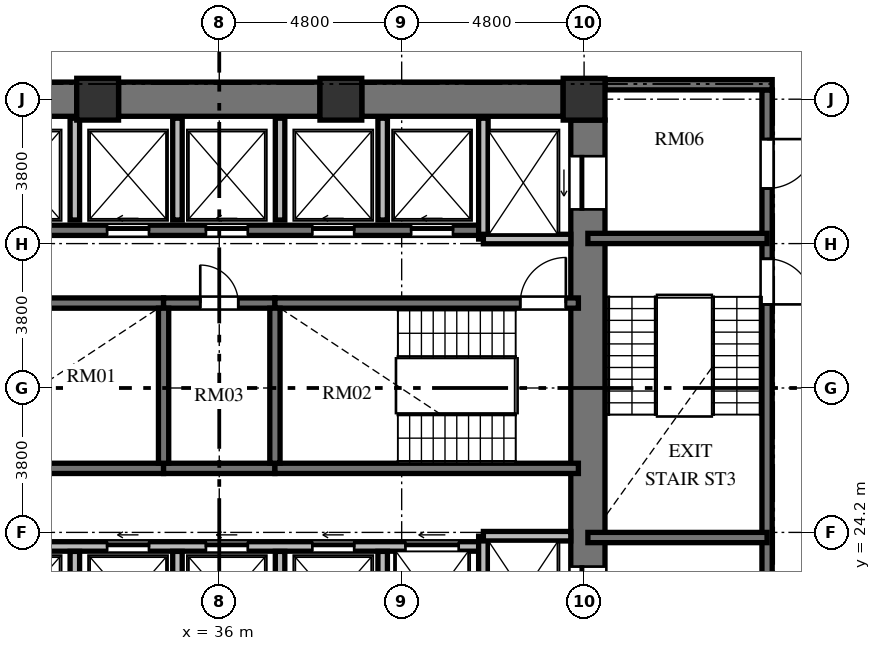
"""IFC4 building model, lengths in metres.
Left out: names, types, materials, properties, quantities, classifications, styles, units other than length and angle.
Written with IfcOpenShell. Run it as: python <this file> out.ifc"""

import sys

from ifc_helpers import new_model, si_unit, direction, frame, frame_2d, origin, origin_2d, place, context, subcontext, project, spatial, rectangle, extrude, element, fill, save


model = new_model("IFC4")
c1 = context("Model", 3, precision=1e-05, world=origin(), true_north=direction((0.0, 1.0)))
c2 = subcontext(c1, "Body", "Model", "MODEL_VIEW")
j1 = project(units=[si_unit("LENGTHUNIT", "METRE"), si_unit("PLANEANGLEUNIT", "RADIAN")], contexts=[c1])
p1 = place(None, origin())
s1 = spatial("IfcSite", under=j1, at=p1, CompositionType="ELEMENT")
p2 = place(p1, origin())
s2 = spatial("IfcBuilding", under=s1, at=p2, CompositionType="ELEMENT")
p3 = place(p2, frame((0.0, 0.0, 25.2)))
s3 = spatial("IfcBuildingStorey", under=s2, at=p3, CompositionType="ELEMENT", Elevation=25.2)
for number, where, z_axis, x_axis in (
    (1, (45.6, 35.6, 0.0), (0.0, 0.0, 1.0), (1.0, 0.0, 0.0)),
    (2, (39.2, 35.6, 0.0), (0.0, 0.0, 1.0), (1.0, 0.0, 0.0)),
    (3, (32.8, 35.6, 0.0), (0.0, 0.0, 1.0), (1.0, 0.0, 0.0)),
):
    element("IfcColumn", number, at=place(p3, frame(where, z_axis=z_axis, x_axis=x_axis)), inside=s3, PredefinedType="COLUMN", context=c2, shape_type="SweptSolid", body=[
        extrude(rectangle(XDim=1.1, YDim=1.1, at=origin_2d()), origin(), (0.0, 0.0, 1.0), 3.648),
    ])
p4 = place(p3, frame((45.7, 20.95, 0.0), z_axis=(0.0, 0.0, 1.0), x_axis=(0.0, 1.0, 0.0)))
e4 = element("IfcWall", 4, at=p4, inside=s3, PredefinedType="SHEAR", context=c2, shape_type="SweptSolid", body=[
    extrude(rectangle(XDim=14.1, YDim=0.9, at=frame_2d((7.05, 0.0))), origin(), (0.0, 0.0, 1.0), 3.648),
])
p5 = place(p4, frame((11.75, 0.0, 0.0)))
e5 = element("IfcOpeningElement", 5, at=p5, cuts=e4, PredefinedType="OPENING", context=c2, shape_type="SweptSolid", body=[
    extrude(rectangle(XDim=1.4, YDim=2.3, at=frame_2d((0.7, 1.15))), frame((0.0, 0.46, 0.0), z_axis=(0.0, -1.0, 0.0), x_axis=(1.0, 0.0, 0.0)), (0.0, 0.0, 1.0), 0.92),
])
p6 = place(p4, frame((0.95, 0.0, 0.0)))
e6 = element("IfcOpeningElement", 6, at=p6, cuts=e4, PredefinedType="OPENING", context=c2, shape_type="SweptSolid", body=[
    extrude(rectangle(XDim=1.4, YDim=2.3, at=frame_2d((0.7, 1.15))), frame((0.0, 0.46, 0.0), z_axis=(0.0, -1.0, 0.0), x_axis=(1.0, 0.0, 0.0)), (0.0, 0.0, 1.0), 0.92),
])
p7 = place(p3, frame((26.95, 35.6, 0.0), z_axis=(0.0, 0.0, 1.0), x_axis=(1.0, 0.0, 0.0)))
e7 = element("IfcWall", 7, at=p7, inside=s3, PredefinedType="SHEAR", context=c2, shape_type="SweptSolid", body=[
    extrude(rectangle(XDim=5.3, YDim=0.9, at=frame_2d((2.65, 0.0))), origin(), (0.0, 0.0, 1.0), 3.648),
])
p8 = place(p3, frame((33.35, 35.6, 0.0), z_axis=(0.0, 0.0, 1.0), x_axis=(1.0, 0.0, 0.0)))
e8 = element("IfcWall", 8, at=p8, inside=s3, PredefinedType="SHEAR", context=c2, shape_type="SweptSolid", body=[
    extrude(rectangle(XDim=5.3, YDim=0.9, at=frame_2d((2.65, 0.0))), origin(), (0.0, 0.0, 1.0), 3.648),
])
p9 = place(p3, frame((39.75, 35.6, 0.0), z_axis=(0.0, 0.0, 1.0), x_axis=(1.0, 0.0, 0.0)))
e9 = element("IfcWall", 9, at=p9, inside=s3, PredefinedType="SHEAR", context=c2, shape_type="SweptSolid", body=[
    extrude(rectangle(XDim=5.3, YDim=0.9, at=frame_2d((2.65, 0.0))), origin(), (0.0, 0.0, 1.0), 3.648),
])
p10 = place(p3, frame((26.55, 30.235, 0.0), z_axis=(0.0, 0.0, 1.0), x_axis=(1.0, 0.0, 0.0)))
e10 = element("IfcWall", 10, at=p10, inside=s3, PredefinedType="SHEAR", context=c2, shape_type="SweptSolid", body=[
    extrude(rectangle(XDim=7.985, YDim=0.27, at=frame_2d((3.992, 0.0))), origin(), (0.0, 0.0, 1.0), 3.648),
])
p11 = place(p3, frame((34.535, 30.235, 0.0), z_axis=(0.0, 0.0, 1.0), x_axis=(1.0, 0.0, 0.0)))
e11 = element("IfcWall", 11, at=p11, inside=s3, PredefinedType="SHEAR", context=c2, shape_type="SweptSolid", body=[
    extrude(rectangle(XDim=2.93, YDim=0.27, at=frame_2d((1.465, 0.0))), origin(), (0.0, 0.0, 1.0), 3.648),
])
p12 = place(p11, frame((0.965, 0.0, 0.0)))
e12 = element("IfcOpeningElement", 12, at=p12, cuts=e11, PredefinedType="OPENING", context=c2, shape_type="SweptSolid", body=[
    extrude(rectangle(XDim=1.0, YDim=2.1, at=frame_2d((0.5, 1.05))), frame((0.0, 0.145, 0.0), z_axis=(0.0, -1.0, 0.0), x_axis=(1.0, 0.0, 0.0)), (0.0, 0.0, 1.0), 0.29),
])
p13 = place(p3, frame((37.465, 30.235, 0.0), z_axis=(0.0, 0.0, 1.0), x_axis=(1.0, 0.0, 0.0)))
e13 = element("IfcWall", 13, at=p13, inside=s3, PredefinedType="SHEAR", context=c2, shape_type="SweptSolid", body=[
    extrude(rectangle(XDim=7.985, YDim=0.27, at=frame_2d((3.992, 0.0))), origin(), (0.0, 0.0, 1.0), 3.648),
])
p14 = place(p13, frame((6.455, 0.0, 0.0)))
e14 = element("IfcOpeningElement", 14, at=p14, cuts=e13, PredefinedType="OPENING", context=c2, shape_type="SweptSolid", body=[
    extrude(rectangle(XDim=1.2, YDim=2.15, at=frame_2d((0.6, 1.075))), frame((0.0, 0.145, 0.0), z_axis=(0.0, -1.0, 0.0), x_axis=(1.0, 0.0, 0.0)), (0.0, 0.0, 1.0), 0.29),
])
p15 = place(p3, frame((26.55, 25.885, 0.0), z_axis=(0.0, 0.0, 1.0), x_axis=(1.0, 0.0, 0.0)))
e15 = element("IfcWall", 15, at=p15, inside=s3, PredefinedType="SHEAR", context=c2, shape_type="SweptSolid", body=[
    extrude(rectangle(XDim=7.985, YDim=0.27, at=frame_2d((3.992, 0.0))), origin(), (0.0, 0.0, 1.0), 3.648),
])
p16 = place(p3, frame((34.535, 25.885, 0.0), z_axis=(0.0, 0.0, 1.0), x_axis=(1.0, 0.0, 0.0)))
e16 = element("IfcWall", 16, at=p16, inside=s3, PredefinedType="SHEAR", context=c2, shape_type="SweptSolid", body=[
    extrude(rectangle(XDim=2.93, YDim=0.27, at=frame_2d((1.465, 0.0))), origin(), (0.0, 0.0, 1.0), 3.648),
])
p17 = place(p3, frame((37.465, 25.885, 0.0), z_axis=(0.0, 0.0, 1.0), x_axis=(1.0, 0.0, 0.0)))
e17 = element("IfcWall", 17, at=p17, inside=s3, PredefinedType="SHEAR", context=c2, shape_type="SweptSolid", body=[
    extrude(rectangle(XDim=7.985, YDim=0.27, at=frame_2d((3.992, 0.0))), origin(), (0.0, 0.0, 1.0), 3.648),
])
for number, where, z_axis, x_axis in (
    (18, (34.535, 26.02, 0.0), (0.0, 0.0, 1.0), (0.0, 1.0, 0.0)),
    (19, (37.465, 26.02, 0.0), (0.0, 0.0, 1.0), (0.0, 1.0, 0.0)),
):
    element("IfcWall", number, at=place(p3, frame(where, z_axis=z_axis, x_axis=x_axis)), inside=s3, PredefinedType="SHEAR", context=c2, shape_type="SweptSolid", body=[
        extrude(rectangle(XDim=4.08, YDim=0.27, at=frame_2d((2.04, 0.0))), origin(), (0.0, 0.0, 1.0), 3.648),
    ])
p18 = place(p3, frame((26.55, 32.15, 0.0), z_axis=(0.0, 0.0, 1.0), x_axis=(1.0, 0.0, 0.0)))
e20 = element("IfcWall", 20, at=p18, inside=s3, PredefinedType="SHEAR", context=c2, shape_type="SweptSolid", body=[
    extrude(rectangle(XDim=16.4, YDim=0.27, at=frame_2d((8.2, 0.0))), origin(), (0.0, 0.0, 1.0), 3.648),
])
p19 = place(p18, frame((1.1, 0.0, 0.0)))
e21 = element("IfcOpeningElement", 21, at=p19, cuts=e20, PredefinedType="OPENING", context=c2, shape_type="SweptSolid", body=[
    extrude(rectangle(XDim=1.1, YDim=2.2, at=frame_2d((0.55, 1.1))), frame((0.0, 0.145, 0.0), z_axis=(0.0, -1.0, 0.0), x_axis=(1.0, 0.0, 0.0)), (0.0, 0.0, 1.0), 0.29),
])
p20 = place(p18, frame((3.7, 0.0, 0.0)))
e22 = element("IfcOpeningElement", 22, at=p20, cuts=e20, PredefinedType="OPENING", context=c2, shape_type="SweptSolid", body=[
    extrude(rectangle(XDim=1.1, YDim=2.2, at=frame_2d((0.55, 1.1))), frame((0.0, 0.145, 0.0), z_axis=(0.0, -1.0, 0.0), x_axis=(1.0, 0.0, 0.0)), (0.0, 0.0, 1.0), 0.29),
])
p21 = place(p18, frame((6.5, 0.0, 0.0)))
e23 = element("IfcOpeningElement", 23, at=p21, cuts=e20, PredefinedType="OPENING", context=c2, shape_type="SweptSolid", body=[
    extrude(rectangle(XDim=1.1, YDim=2.2, at=frame_2d((0.55, 1.1))), frame((0.0, 0.145, 0.0), z_axis=(0.0, -1.0, 0.0), x_axis=(1.0, 0.0, 0.0)), (0.0, 0.0, 1.0), 0.29),
])
p22 = place(p18, frame((9.1, 0.0, 0.0)))
e24 = element("IfcOpeningElement", 24, at=p22, cuts=e20, PredefinedType="OPENING", context=c2, shape_type="SweptSolid", body=[
    extrude(rectangle(XDim=1.1, YDim=2.2, at=frame_2d((0.55, 1.1))), frame((0.0, 0.145, 0.0), z_axis=(0.0, -1.0, 0.0), x_axis=(1.0, 0.0, 0.0)), (0.0, 0.0, 1.0), 0.29),
])
p23 = place(p18, frame((11.9, 0.0, 0.0)))
e25 = element("IfcOpeningElement", 25, at=p23, cuts=e20, PredefinedType="OPENING", context=c2, shape_type="SweptSolid", body=[
    extrude(rectangle(XDim=1.1, YDim=2.2, at=frame_2d((0.55, 1.1))), frame((0.0, 0.145, 0.0), z_axis=(0.0, -1.0, 0.0), x_axis=(1.0, 0.0, 0.0)), (0.0, 0.0, 1.0), 0.29),
])
p24 = place(p18, frame((14.5, 0.0, 0.0)))
e26 = element("IfcOpeningElement", 26, at=p24, cuts=e20, PredefinedType="OPENING", context=c2, shape_type="SweptSolid", body=[
    extrude(rectangle(XDim=1.1, YDim=2.2, at=frame_2d((0.55, 1.1))), frame((0.0, 0.145, 0.0), z_axis=(0.0, -1.0, 0.0), x_axis=(1.0, 0.0, 0.0)), (0.0, 0.0, 1.0), 0.29),
])
p25 = place(p3, frame((26.75, 23.83, 0.0), z_axis=(0.0, 0.0, 1.0), x_axis=(1.0, 0.0, 0.0)))
e27 = element("IfcWall", 27, at=p25, inside=s3, PredefinedType="SOLIDWALL", context=c2, shape_type="SweptSolid", body=[
    extrude(rectangle(XDim=16.2, YDim=0.25, at=frame_2d((8.1, 0.0))), origin(), (0.0, 0.0, 1.0), 3.428),
])
p26 = place(p25, frame((0.9, 0.0, 0.0)))
e28 = element("IfcOpeningElement", 28, at=p26, cuts=e27, PredefinedType="OPENING", context=c2, shape_type="SweptSolid", body=[
    extrude(rectangle(XDim=1.1, YDim=2.2, at=frame_2d((0.55, 1.1))), frame((0.0, 0.135, 0.0), z_axis=(0.0, -1.0, 0.0), x_axis=(1.0, 0.0, 0.0)), (0.0, 0.0, 1.0), 0.27),
])
p27 = place(p25, frame((3.5, 0.0, 0.0)))
e29 = element("IfcOpeningElement", 29, at=p27, cuts=e27, PredefinedType="OPENING", context=c2, shape_type="SweptSolid", body=[
    extrude(rectangle(XDim=1.1, YDim=2.2, at=frame_2d((0.55, 1.1))), frame((0.0, 0.135, 0.0), z_axis=(0.0, -1.0, 0.0), x_axis=(1.0, 0.0, 0.0)), (0.0, 0.0, 1.0), 0.27),
])
p28 = place(p25, frame((6.3, 0.0, 0.0)))
e30 = element("IfcOpeningElement", 30, at=p28, cuts=e27, PredefinedType="OPENING", context=c2, shape_type="SweptSolid", body=[
    extrude(rectangle(XDim=1.1, YDim=2.2, at=frame_2d((0.55, 1.1))), frame((0.0, 0.135, 0.0), z_axis=(0.0, -1.0, 0.0), x_axis=(1.0, 0.0, 0.0)), (0.0, 0.0, 1.0), 0.27),
])
p29 = place(p25, frame((8.9, 0.0, 0.0)))
e31 = element("IfcOpeningElement", 31, at=p29, cuts=e27, PredefinedType="OPENING", context=c2, shape_type="SweptSolid", body=[
    extrude(rectangle(XDim=1.1, YDim=2.2, at=frame_2d((0.55, 1.1))), frame((0.0, 0.135, 0.0), z_axis=(0.0, -1.0, 0.0), x_axis=(1.0, 0.0, 0.0)), (0.0, 0.0, 1.0), 0.27),
])
p30 = place(p25, frame((11.7, 0.0, 0.0)))
e32 = element("IfcOpeningElement", 32, at=p30, cuts=e27, PredefinedType="OPENING", context=c2, shape_type="SweptSolid", body=[
    extrude(rectangle(XDim=1.1, YDim=2.2, at=frame_2d((0.55, 1.1))), frame((0.0, 0.135, 0.0), z_axis=(0.0, -1.0, 0.0), x_axis=(1.0, 0.0, 0.0)), (0.0, 0.0, 1.0), 0.27),
])
p31 = place(p25, frame((14.15, 0.0, 0.0)))
e33 = element("IfcOpeningElement", 33, at=p31, cuts=e27, PredefinedType="OPENING", context=c2, shape_type="SweptSolid", body=[
    extrude(rectangle(XDim=1.4, YDim=2.3, at=frame_2d((0.7, 1.15))), frame((0.0, 0.135, 0.0), z_axis=(0.0, -1.0, 0.0), x_axis=(1.0, 0.0, 0.0)), (0.0, 0.0, 1.0), 0.27),
])
p32 = place(p3, frame((42.95, 31.92, 0.0), z_axis=(0.0, 0.0, 1.0), x_axis=(0.0, 1.0, 0.0)))
e34 = element("IfcWall", 34, at=p32, inside=s3, PredefinedType="SOLIDWALL", context=c2, shape_type="SweptSolid", body=[
    extrude(rectangle(XDim=3.18, YDim=0.25, at=frame_2d((1.59, 0.0))), origin(), (0.0, 0.0, 1.0), 3.428),
])
p33 = place(p3, frame((42.95, 31.92, 0.0), z_axis=(0.0, 0.0, 1.0), x_axis=(1.0, 0.0, 0.0)))
e35 = element("IfcWall", 35, at=p33, inside=s3, PredefinedType="SOLIDWALL", context=c2, shape_type="SweptSolid", body=[
    extrude(rectangle(XDim=2.3, YDim=0.25, at=frame_2d((1.15, 0.0))), origin(), (0.0, 0.0, 1.0), 3.428),
])
p34 = place(p3, frame((42.95, 20.9, 0.0), z_axis=(0.0, 0.0, 1.0), x_axis=(0.0, 1.0, 0.0)))
e36 = element("IfcWall", 36, at=p34, inside=s3, PredefinedType="SOLIDWALL", context=c2, shape_type="SweptSolid", body=[
    extrude(rectangle(XDim=3.2, YDim=0.25, at=frame_2d((1.6, 0.0))), origin(), (0.0, 0.0, 1.0), 3.428),
])
p35 = place(p3, frame((42.95, 24.1, 0.0), z_axis=(0.0, 0.0, 1.0), x_axis=(1.0, 0.0, 0.0)))
e37 = element("IfcWall", 37, at=p35, inside=s3, PredefinedType="SOLIDWALL", context=c2, shape_type="SweptSolid", body=[
    extrude(rectangle(XDim=2.3, YDim=0.25, at=frame_2d((1.15, 0.0))), origin(), (0.0, 0.0, 1.0), 3.428),
])
p36 = place(p3, frame((32.2, 32.42, 0.0), z_axis=(0.0, 0.0, 1.0), x_axis=(0.0, 1.0, 0.0)))
e38 = element("IfcWall", 38, at=p36, inside=s3, PredefinedType="SOLIDWALL", context=c2, shape_type="SweptSolid", body=[
    extrude(rectangle(XDim=2.68, YDim=0.25, at=frame_2d((1.34, 0.0))), origin(), (0.0, 0.0, 1.0), 3.428),
])
p37 = place(p3, frame((32.2, 20.9, 0.0), z_axis=(0.0, 0.0, 1.0), x_axis=(0.0, 1.0, 0.0)))
e39 = element("IfcWall", 39, at=p37, inside=s3, PredefinedType="SOLIDWALL", context=c2, shape_type="SweptSolid", body=[
    extrude(rectangle(XDim=2.8, YDim=0.25, at=frame_2d((1.4, 0.0))), origin(), (0.0, 0.0, 1.0), 3.428),
])
p38 = place(p3, frame((34.9, 32.42, 0.0), z_axis=(0.0, 0.0, 1.0), x_axis=(0.0, 1.0, 0.0)))
e40 = element("IfcWall", 40, at=p38, inside=s3, PredefinedType="SOLIDWALL", context=c2, shape_type="SweptSolid", body=[
    extrude(rectangle(XDim=2.68, YDim=0.25, at=frame_2d((1.34, 0.0))), origin(), (0.0, 0.0, 1.0), 3.428),
])
p39 = place(p3, frame((34.9, 20.9, 0.0), z_axis=(0.0, 0.0, 1.0), x_axis=(0.0, 1.0, 0.0)))
e41 = element("IfcWall", 41, at=p39, inside=s3, PredefinedType="SOLIDWALL", context=c2, shape_type="SweptSolid", body=[
    extrude(rectangle(XDim=2.8, YDim=0.25, at=frame_2d((1.4, 0.0))), origin(), (0.0, 0.0, 1.0), 3.428),
])
p40 = place(p3, frame((37.6, 32.42, 0.0), z_axis=(0.0, 0.0, 1.0), x_axis=(0.0, 1.0, 0.0)))
e42 = element("IfcWall", 42, at=p40, inside=s3, PredefinedType="SOLIDWALL", context=c2, shape_type="SweptSolid", body=[
    extrude(rectangle(XDim=2.68, YDim=0.25, at=frame_2d((1.34, 0.0))), origin(), (0.0, 0.0, 1.0), 3.428),
])
p41 = place(p3, frame((37.6, 20.9, 0.0), z_axis=(0.0, 0.0, 1.0), x_axis=(0.0, 1.0, 0.0)))
e43 = element("IfcWall", 43, at=p41, inside=s3, PredefinedType="SOLIDWALL", context=c2, shape_type="SweptSolid", body=[
    extrude(rectangle(XDim=2.8, YDim=0.25, at=frame_2d((1.4, 0.0))), origin(), (0.0, 0.0, 1.0), 3.428),
])
p42 = place(p3, frame((40.3, 32.42, 0.0), z_axis=(0.0, 0.0, 1.0), x_axis=(0.0, 1.0, 0.0)))
e44 = element("IfcWall", 44, at=p42, inside=s3, PredefinedType="SOLIDWALL", context=c2, shape_type="SweptSolid", body=[
    extrude(rectangle(XDim=2.68, YDim=0.25, at=frame_2d((1.34, 0.0))), origin(), (0.0, 0.0, 1.0), 3.428),
])
p43 = place(p3, frame((40.3, 20.9, 0.0), z_axis=(0.0, 0.0, 1.0), x_axis=(0.0, 1.0, 0.0)))
e45 = element("IfcWall", 45, at=p43, inside=s3, PredefinedType="SOLIDWALL", context=c2, shape_type="SweptSolid", body=[
    extrude(rectangle(XDim=2.8, YDim=0.25, at=frame_2d((1.4, 0.0))), origin(), (0.0, 0.0, 1.0), 3.428),
])
p44 = place(p3, frame((50.415, 35.845, 0.0), z_axis=(0.0, 0.0, 1.0), x_axis=(0.0, -1.0, 0.0)))
e46 = element("IfcWall", 46, at=p44, inside=s3, PredefinedType="SHEAR", context=c2, shape_type="SweptSolid", body=[
    extrude(rectangle(XDim=15.825, YDim=0.27, at=frame_2d((7.913, 0.0))), origin(), (0.0, 0.0, 1.0), 3.648),
])
p45 = place(p44, frame((4.445, 0.0, 0.0)))
e47 = element("IfcOpeningElement", 47, at=p45, cuts=e46, PredefinedType="OPENING", context=c2, shape_type="SweptSolid", body=[
    extrude(rectangle(XDim=1.2, YDim=2.15, at=frame_2d((0.6, 1.075))), frame((0.0, 0.145, 0.0), z_axis=(0.0, -1.0, 0.0), x_axis=(1.0, 0.0, 0.0)), (0.0, 0.0, 1.0), 0.29),
])
p46 = place(p44, frame((1.295, 0.0, 0.0)))
e48 = element("IfcOpeningElement", 48, at=p46, cuts=e46, PredefinedType="OPENING", context=c2, shape_type="SweptSolid", body=[
    extrude(rectangle(XDim=1.3, YDim=2.2, at=frame_2d((0.65, 1.1))), frame((0.0, 0.145, 0.0), z_axis=(0.0, -1.0, 0.0), x_axis=(1.0, 0.0, 0.0)), (0.0, 0.0, 1.0), 0.29),
])
p47 = place(p44, frame((13.095, 0.0, 0.0)))
e49 = element("IfcOpeningElement", 49, at=p47, cuts=e46, PredefinedType="OPENING", context=c2, shape_type="SweptSolid", body=[
    extrude(rectangle(XDim=1.3, YDim=2.2, at=frame_2d((0.65, 1.1))), frame((0.0, 0.145, 0.0), z_axis=(0.0, -1.0, 0.0), x_axis=(1.0, 0.0, 0.0)), (0.0, 0.0, 1.0), 0.29),
])
p48 = place(p3, frame((46.15, 35.98, 0.0), z_axis=(0.0, 0.0, 1.0), x_axis=(1.0, 0.0, 0.0)))
e50 = element("IfcWall", 50, at=p48, inside=s3, PredefinedType="SHEAR", context=c2, shape_type="SweptSolid", body=[
    extrude(rectangle(XDim=4.4, YDim=0.27, at=frame_2d((2.2, 0.0))), origin(), (0.0, 0.0, 1.0), 3.648),
])
for number, where, z_axis, x_axis in (
    (51, (45.7, 31.935, 0.0), (0.0, 0.0, 1.0), (1.0, 0.0, 0.0)),
    (52, (45.7, 24.065, 0.0), (0.0, 0.0, 1.0), (1.0, 0.0, 0.0)),
):
    element("IfcWall", number, at=place(p3, frame(where, z_axis=z_axis, x_axis=x_axis)), inside=s3, PredefinedType="SHEAR", context=c2, shape_type="SweptSolid", body=[
        extrude(rectangle(XDim=4.715, YDim=0.27, at=frame_2d((2.357, 0.0))), origin(), (0.0, 0.0, 1.0), 3.648),
    ])
p49 = place(p14, origin())
e53 = element("IfcDoor", 53, at=p49, inside=s3, OperationType="SINGLE_SWING_RIGHT", PredefinedType="DOOR", context=c2, shape_type="SweptSolid", body=[
    extrude(rectangle(XDim=1.2, YDim=2.15, at=frame_2d((0.6, 1.075))), frame((0.0, 0.025, 0.0), z_axis=(0.0, -1.0, 0.0), x_axis=(1.0, 0.0, 0.0)), (0.0, 0.0, 1.0), 0.05),
])
fill(e14, e53)
p50 = place(p12, origin())
e54 = element("IfcDoor", 54, at=p50, inside=s3, OperationType="SINGLE_SWING_LEFT", PredefinedType="DOOR", context=c2, shape_type="SweptSolid", body=[
    extrude(rectangle(XDim=1.0, YDim=2.1, at=frame_2d((0.5, 1.05))), frame((0.0, 0.025, 0.0), z_axis=(0.0, -1.0, 0.0), x_axis=(1.0, 0.0, 0.0)), (0.0, 0.0, 1.0), 0.05),
])
fill(e12, e54)
p51 = place(p21, origin())
e55 = element("IfcDoor", 55, at=p51, inside=s3, OperationType="SLIDING_TO_LEFT", PredefinedType="DOOR", context=c2, shape_type="SweptSolid", body=[
    extrude(rectangle(XDim=1.1, YDim=2.2, at=frame_2d((0.55, 1.1))), frame((0.0, 0.025, 0.0), z_axis=(0.0, -1.0, 0.0), x_axis=(1.0, 0.0, 0.0)), (0.0, 0.0, 1.0), 0.05),
])
fill(e23, e55)
p52 = place(p22, origin())
e56 = element("IfcDoor", 56, at=p52, inside=s3, OperationType="SLIDING_TO_LEFT", PredefinedType="DOOR", context=c2, shape_type="SweptSolid", body=[
    extrude(rectangle(XDim=1.1, YDim=2.2, at=frame_2d((0.55, 1.1))), frame((0.0, 0.025, 0.0), z_axis=(0.0, -1.0, 0.0), x_axis=(1.0, 0.0, 0.0)), (0.0, 0.0, 1.0), 0.05),
])
fill(e24, e56)
p53 = place(p28, origin())
e57 = element("IfcDoor", 57, at=p53, inside=s3, OperationType="SLIDING_TO_LEFT", PredefinedType="DOOR", context=c2, shape_type="SweptSolid", body=[
    extrude(rectangle(XDim=1.1, YDim=2.2, at=frame_2d((0.55, 1.1))), frame((0.0, 0.025, 0.0), z_axis=(0.0, -1.0, 0.0), x_axis=(1.0, 0.0, 0.0)), (0.0, 0.0, 1.0), 0.05),
])
fill(e30, e57)
p54 = place(p29, origin())
e58 = element("IfcDoor", 58, at=p54, inside=s3, OperationType="SLIDING_TO_LEFT", PredefinedType="DOOR", context=c2, shape_type="SweptSolid", body=[
    extrude(rectangle(XDim=1.1, YDim=2.2, at=frame_2d((0.55, 1.1))), frame((0.0, 0.025, 0.0), z_axis=(0.0, -1.0, 0.0), x_axis=(1.0, 0.0, 0.0)), (0.0, 0.0, 1.0), 0.05),
])
fill(e31, e58)
p55 = place(p23, origin())
e59 = element("IfcDoor", 59, at=p55, inside=s3, OperationType="SLIDING_TO_LEFT", PredefinedType="DOOR", context=c2, shape_type="SweptSolid", body=[
    extrude(rectangle(XDim=1.1, YDim=2.2, at=frame_2d((0.55, 1.1))), frame((0.0, 0.025, 0.0), z_axis=(0.0, -1.0, 0.0), x_axis=(1.0, 0.0, 0.0)), (0.0, 0.0, 1.0), 0.05),
])
fill(e25, e59)
p56 = place(p24, origin())
e60 = element("IfcDoor", 60, at=p56, inside=s3, OperationType="SLIDING_TO_LEFT", PredefinedType="DOOR", context=c2, shape_type="SweptSolid", body=[
    extrude(rectangle(XDim=1.1, YDim=2.2, at=frame_2d((0.55, 1.1))), frame((0.0, 0.025, 0.0), z_axis=(0.0, -1.0, 0.0), x_axis=(1.0, 0.0, 0.0)), (0.0, 0.0, 1.0), 0.05),
])
fill(e26, e60)
p57 = place(p30, origin())
e61 = element("IfcDoor", 61, at=p57, inside=s3, OperationType="SLIDING_TO_LEFT", PredefinedType="DOOR", context=c2, shape_type="SweptSolid", body=[
    extrude(rectangle(XDim=1.1, YDim=2.2, at=frame_2d((0.55, 1.1))), frame((0.0, 0.025, 0.0), z_axis=(0.0, -1.0, 0.0), x_axis=(1.0, 0.0, 0.0)), (0.0, 0.0, 1.0), 0.05),
])
fill(e32, e61)
p58 = place(p5, origin())
e62 = element("IfcDoor", 62, at=p58, inside=s3, OperationType="SLIDING_TO_LEFT", PredefinedType="DOOR", context=c2, shape_type="SweptSolid", body=[
    extrude(rectangle(XDim=1.4, YDim=2.3, at=frame_2d((0.7, 1.15))), frame((0.0, 0.025, 0.0), z_axis=(0.0, -1.0, 0.0), x_axis=(1.0, 0.0, 0.0)), (0.0, 0.0, 1.0), 0.05),
])
fill(e5, e62)
p59 = place(p6, origin())
e63 = element("IfcDoor", 63, at=p59, inside=s3, OperationType="SLIDING_TO_LEFT", PredefinedType="DOOR", context=c2, shape_type="SweptSolid", body=[
    extrude(rectangle(XDim=1.4, YDim=2.3, at=frame_2d((0.7, 1.15))), frame((0.0, 0.025, 0.0), z_axis=(0.0, -1.0, 0.0), x_axis=(1.0, 0.0, 0.0)), (0.0, 0.0, 1.0), 0.05),
])
fill(e6, e63)
p60 = place(p31, origin())
e64 = element("IfcDoor", 64, at=p60, inside=s3, OperationType="SLIDING_TO_LEFT", PredefinedType="DOOR", context=c2, shape_type="SweptSolid", body=[
    extrude(rectangle(XDim=1.4, YDim=2.3, at=frame_2d((0.7, 1.15))), frame((0.0, 0.025, 0.0), z_axis=(0.0, -1.0, 0.0), x_axis=(1.0, 0.0, 0.0)), (0.0, 0.0, 1.0), 0.05),
])
fill(e33, e64)
p61 = place(p45, origin())
e65 = element("IfcDoor", 65, at=p61, inside=s3, OperationType="SINGLE_SWING_RIGHT", PredefinedType="DOOR", context=c2, shape_type="SweptSolid", body=[
    extrude(rectangle(XDim=1.2, YDim=2.15, at=frame_2d((0.6, 1.075))), frame((0.0, 0.025, 0.0), z_axis=(0.0, -1.0, 0.0), x_axis=(1.0, 0.0, 0.0)), (0.0, 0.0, 1.0), 0.05),
])
fill(e47, e65)
p62 = place(p46, origin())
e66 = element("IfcDoor", 66, at=p62, inside=s3, OperationType="SINGLE_SWING_LEFT", PredefinedType="DOOR", context=c2, shape_type="SweptSolid", body=[
    extrude(rectangle(XDim=1.3, YDim=2.2, at=frame_2d((0.65, 1.1))), frame((0.0, 0.025, 0.0), z_axis=(0.0, -1.0, 0.0), x_axis=(1.0, 0.0, 0.0)), (0.0, 0.0, 1.0), 0.05),
])
fill(e48, e66)
save(model, sys.argv[1])
